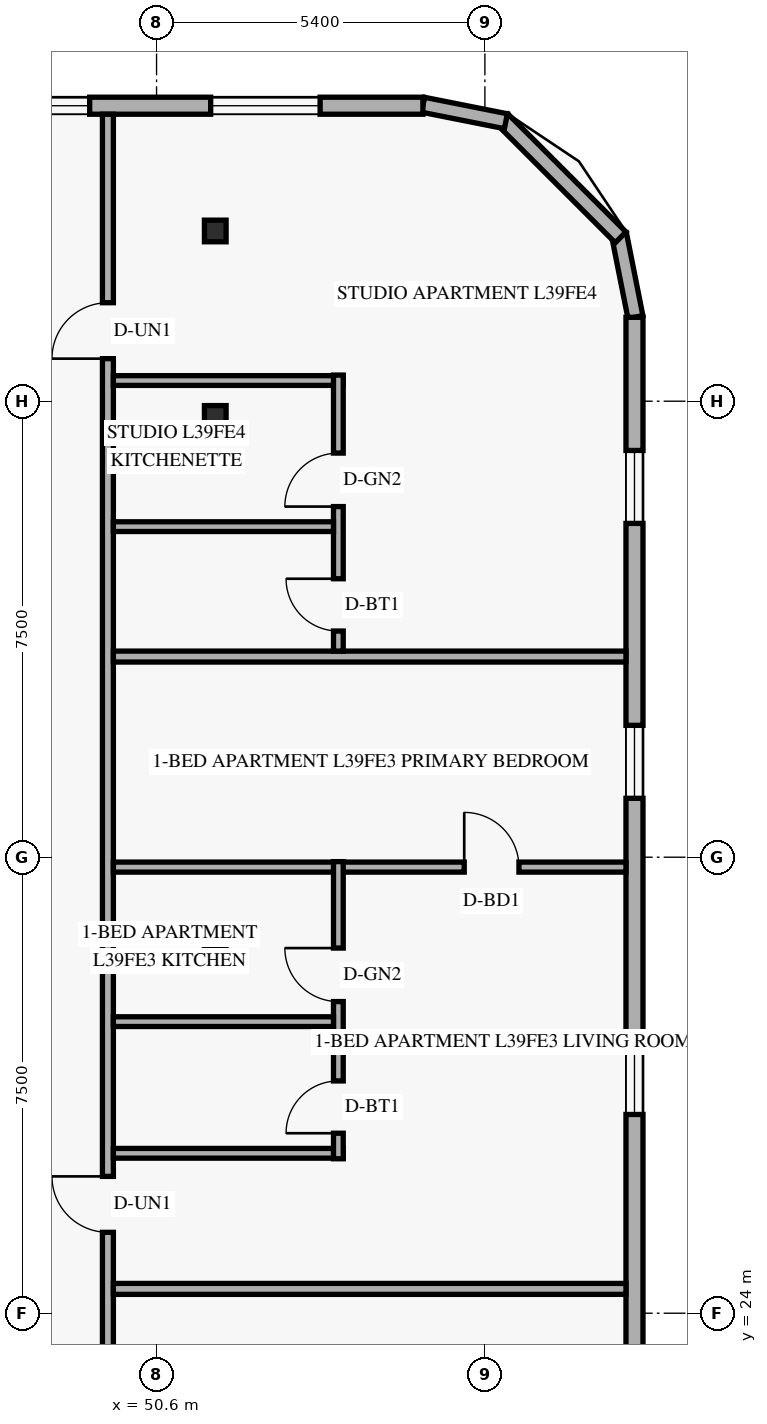
"""IFC4 building model, lengths in metres.
Left out: names, types, materials, properties, quantities, classifications, styles, units other than length and angle.
Written with IfcOpenShell. Run it as: python <this file> out.ifc"""

import sys

from ifc_helpers import new_model, si_unit, direction, frame, frame_2d, origin, origin_2d, place, context, subcontext, project, spatial, rectangle, hollow_rectangle, extrude, element, fill, save


model = new_model("IFC4")
c1 = context("Model", 3, precision=1e-05, world=origin(), true_north=direction((0.0, 1.0)))
c2 = subcontext(c1, "Body", "Model", "MODEL_VIEW")
j1 = project(units=[si_unit("LENGTHUNIT", "METRE"), si_unit("PLANEANGLEUNIT", "RADIAN")], contexts=[c1])
p1 = place(None, origin())
s1 = spatial("IfcSite", under=j1, at=p1, CompositionType="ELEMENT")
p2 = place(p1, origin())
s2 = spatial("IfcBuilding", under=s1, at=p2, CompositionType="ELEMENT")
p3 = place(p2, frame((0.0, 0.0, 151.8)))
s3 = spatial("IfcBuildingStorey", under=s2, at=p3, CompositionType="ELEMENT", Elevation=151.8)
for number, where, z_axis, x_axis in (
    (1, (51.461, 30.2, 0.0), (0.058, 0.0, 0.998), (0.0, 1.0, 0.0)),
    (2, (51.461, 38.75, 0.0), (0.058, 0.0, 0.998), (0.0, 1.0, 0.0)),
    (3, (51.461, 41.8, 0.0), (0.058, 0.0, 0.998), (0.0, 1.0, 0.0)),
):
    element("IfcColumn", number, at=place(p3, frame(where, z_axis=z_axis, x_axis=x_axis)), inside=s3, PredefinedType="COLUMN", context=c2, shape_type="SweptSolid", body=[
        extrude(hollow_rectangle(XDim=0.356, YDim=0.356, WallThickness=0.016, at=origin_2d()), origin(), (0.0, 0.0, 1.0), 3.606),
    ])
p4 = place(p3, frame((58.476, 40.384, 0.0), z_axis=(0.0, 0.0, 1.0), x_axis=(-0.19496651342, 0.980809899341, 0.0)))
e4 = element("IfcWall", 4, at=p4, inside=s3, PredefinedType="SOLIDWALL", context=c2, shape_type="SweptSolid", body=[
    extrude(rectangle(XDim=1.389, YDim=0.25, at=frame_2d((0.694, 0.0))), origin(), (0.0, 0.0, 1.0), 3.36),
])
p5 = place(p3, frame((58.232, 41.695, 0.0), z_axis=(0.0, 0.0, 1.0), x_axis=(-0.707106781187, 0.707106781187, 0.0)))
e5 = element("IfcWall", 5, at=p5, inside=s3, PredefinedType="SOLIDWALL", context=c2, shape_type="SweptSolid", body=[
    extrude(rectangle(XDim=2.739, YDim=0.25, at=frame_2d((1.37, 0.0))), origin(), (0.0, 0.0, 1.0), 3.36),
])
p6 = place(p3, frame((56.345, 43.605, 0.0), z_axis=(0.0, 0.0, 1.0), x_axis=(-0.980809899341, 0.19496651342, 0.0)))
e6 = element("IfcWall", 6, at=p6, inside=s3, PredefinedType="SOLIDWALL", context=c2, shape_type="SweptSolid", body=[
    extrude(rectangle(XDim=1.389, YDim=0.25, at=frame_2d((0.694, 0.0))), origin(), (0.0, 0.0, 1.0), 3.36),
])
p7 = place(p3, frame((58.46, 7.62, 0.0), z_axis=(0.0, 0.0, 1.0), x_axis=(0.0, 1.0, 0.0)))
e7 = element("IfcWall", 7, at=p7, inside=s3, PredefinedType="SOLIDWALL", context=c2, shape_type="SweptSolid", body=[
    extrude(rectangle(XDim=32.76, YDim=0.28, at=frame_2d((16.38, 0.0))), origin(), (0.0, 0.0, 1.0), 3.36),
])
p8 = place(p7, frame((2.39, 0.0, 0.85)))
e8 = element("IfcOpeningElement", 8, at=p8, cuts=e7, PredefinedType="OPENING", context=c2, shape_type="SweptSolid", body=[
    extrude(rectangle(XDim=1.2, YDim=1.5, at=frame_2d((0.6, 0.75))), frame((0.0, 0.15, 0.0), z_axis=(0.0, -1.0, 0.0), x_axis=(1.0, 0.0, 0.0)), (0.0, 0.0, 1.0), 0.3),
])
p9 = place(p7, frame((8.325, 0.0, 0.85)))
e9 = element("IfcOpeningElement", 9, at=p9, cuts=e7, PredefinedType="OPENING", context=c2, shape_type="SweptSolid", body=[
    extrude(rectangle(XDim=1.2, YDim=1.5, at=frame_2d((0.6, 0.75))), frame((0.0, 0.15, 0.0), z_axis=(0.0, -1.0, 0.0), x_axis=(1.0, 0.0, 0.0)), (0.0, 0.0, 1.0), 0.3),
])
p10 = place(p7, frame((13.725, 0.0, 0.85)))
e10 = element("IfcOpeningElement", 10, at=p10, cuts=e7, PredefinedType="OPENING", context=c2, shape_type="SweptSolid", body=[
    extrude(rectangle(XDim=1.2, YDim=1.5, at=frame_2d((0.6, 0.75))), frame((0.0, 0.15, 0.0), z_axis=(0.0, -1.0, 0.0), x_axis=(1.0, 0.0, 0.0)), (0.0, 0.0, 1.0), 0.3),
])
p11 = place(p7, frame((19.649, 0.0, 0.85)))
e11 = element("IfcOpeningElement", 11, at=p11, cuts=e7, PredefinedType="OPENING", context=c2, shape_type="SweptSolid", body=[
    extrude(rectangle(XDim=1.2, YDim=1.5, at=frame_2d((0.6, 0.75))), frame((0.0, 0.15, 0.0), z_axis=(0.0, -1.0, 0.0), x_axis=(1.0, 0.0, 0.0)), (0.0, 0.0, 1.0), 0.3),
])
p12 = place(p7, frame((24.849, 0.0, 0.85)))
e12 = element("IfcOpeningElement", 12, at=p12, cuts=e7, PredefinedType="OPENING", context=c2, shape_type="SweptSolid", body=[
    extrude(rectangle(XDim=1.2, YDim=1.5, at=frame_2d((0.6, 0.75))), frame((0.0, 0.15, 0.0), z_axis=(0.0, -1.0, 0.0), x_axis=(1.0, 0.0, 0.0)), (0.0, 0.0, 1.0), 0.3),
])
p13 = place(p7, frame((29.37, 0.0, 0.85)))
e13 = element("IfcOpeningElement", 13, at=p13, cuts=e7, PredefinedType="OPENING", context=c2, shape_type="SweptSolid", body=[
    extrude(rectangle(XDim=1.2, YDim=1.5, at=frame_2d((0.6, 0.75))), frame((0.0, 0.15, 0.0), z_axis=(0.0, -1.0, 0.0), x_axis=(1.0, 0.0, 0.0)), (0.0, 0.0, 1.0), 0.3),
])
p14 = place(p3, frame((54.98, 43.86, 0.0), z_axis=(0.0, 0.0, 1.0), x_axis=(-1.0, 0.0, 0.0)))
e14 = element("IfcWall", 14, at=p14, inside=s3, PredefinedType="SOLIDWALL", context=c2, shape_type="SweptSolid", body=[
    extrude(rectangle(XDim=33.76, YDim=0.28, at=frame_2d((16.88, 0.0))), origin(), (0.0, 0.0, 1.0), 3.36),
])
p15 = place(p14, frame((28.055, 0.0, 0.85)))
e15 = element("IfcOpeningElement", 15, at=p15, cuts=e14, PredefinedType="OPENING", context=c2, shape_type="SweptSolid", body=[
    extrude(rectangle(XDim=1.8, YDim=1.6, at=frame_2d((0.9, 0.8))), frame((0.0, 0.15, 0.0), z_axis=(0.0, -1.0, 0.0), x_axis=(1.0, 0.0, 0.0)), (0.0, 0.0, 1.0), 0.3),
])
p16 = place(p14, frame((21.17, 0.0, 0.85)))
e16 = element("IfcOpeningElement", 16, at=p16, cuts=e14, PredefinedType="OPENING", context=c2, shape_type="SweptSolid", body=[
    extrude(rectangle(XDim=1.8, YDim=1.6, at=frame_2d((0.9, 0.8))), frame((0.0, 0.15, 0.0), z_axis=(0.0, -1.0, 0.0), x_axis=(1.0, 0.0, 0.0)), (0.0, 0.0, 1.0), 0.3),
])
p17 = place(p14, frame((14.865, 0.0, 0.85)))
e17 = element("IfcOpeningElement", 17, at=p17, cuts=e14, PredefinedType="OPENING", context=c2, shape_type="SweptSolid", body=[
    extrude(rectangle(XDim=1.8, YDim=1.6, at=frame_2d((0.9, 0.8))), frame((0.0, 0.15, 0.0), z_axis=(0.0, -1.0, 0.0), x_axis=(1.0, 0.0, 0.0)), (0.0, 0.0, 1.0), 0.3),
])
p18 = place(p14, frame((8.575, 0.0, 0.85)))
e18 = element("IfcOpeningElement", 18, at=p18, cuts=e14, PredefinedType="OPENING", context=c2, shape_type="SweptSolid", body=[
    extrude(rectangle(XDim=1.8, YDim=1.6, at=frame_2d((0.9, 0.8))), frame((0.0, 0.15, 0.0), z_axis=(0.0, -1.0, 0.0), x_axis=(1.0, 0.0, 0.0)), (0.0, 0.0, 1.0), 0.3),
])
p19 = place(p14, frame((5.48, 0.0, 0.85)))
e19 = element("IfcOpeningElement", 19, at=p19, cuts=e14, PredefinedType="OPENING", context=c2, shape_type="SweptSolid", body=[
    extrude(rectangle(XDim=1.2, YDim=1.5, at=frame_2d((0.6, 0.75))), frame((0.0, 0.15, 0.0), z_axis=(0.0, -1.0, 0.0), x_axis=(1.0, 0.0, 0.0)), (0.0, 0.0, 1.0), 0.3),
])
p20 = place(p14, frame((1.69, 0.0, 0.85)))
e20 = element("IfcOpeningElement", 20, at=p20, cuts=e14, PredefinedType="OPENING", context=c2, shape_type="SweptSolid", body=[
    extrude(rectangle(XDim=1.8, YDim=1.6, at=frame_2d((0.9, 0.8))), frame((0.0, 0.15, 0.0), z_axis=(0.0, -1.0, 0.0), x_axis=(1.0, 0.0, 0.0)), (0.0, 0.0, 1.0), 0.3),
])
p21 = place(p3, frame((49.8, 4.28, 0.0), z_axis=(0.0, 0.0, 1.0), x_axis=(0.0, 1.0, 0.0)))
e21 = element("IfcWall", 21, at=p21, inside=s3, PredefinedType="STANDARD", context=c2, shape_type="SweptSolid", body=[
    extrude(rectangle(XDim=39.44, YDim=0.18, at=frame_2d((19.72, 0.0))), origin(), (0.0, 0.0, 1.0), 2.73),
])
p22 = place(p21, frame((3.38, 0.0, 0.0)))
e22 = element("IfcOpeningElement", 22, at=p22, cuts=e21, PredefinedType="OPENING", context=c2, shape_type="SweptSolid", body=[
    extrude(rectangle(XDim=0.92, YDim=2.15, at=frame_2d((0.46, 1.075))), frame((0.0, 0.1, 0.0), z_axis=(0.0, -1.0, 0.0), x_axis=(1.0, 0.0, 0.0)), (0.0, 0.0, 1.0), 0.2),
])
p23 = place(p21, frame((14.32, 0.0, 0.0)))
e23 = element("IfcOpeningElement", 23, at=p23, cuts=e21, PredefinedType="OPENING", context=c2, shape_type="SweptSolid", body=[
    extrude(rectangle(XDim=0.92, YDim=2.15, at=frame_2d((0.46, 1.075))), frame((0.0, 0.1, 0.0), z_axis=(0.0, -1.0, 0.0), x_axis=(1.0, 0.0, 0.0)), (0.0, 0.0, 1.0), 0.2),
])
p24 = place(p21, frame((21.05, 0.0, 0.0)))
e24 = element("IfcOpeningElement", 24, at=p24, cuts=e21, PredefinedType="OPENING", context=c2, shape_type="SweptSolid", body=[
    extrude(rectangle(XDim=0.92, YDim=2.15, at=frame_2d((0.46, 1.075))), frame((0.0, 0.1, 0.0), z_axis=(0.0, -1.0, 0.0), x_axis=(1.0, 0.0, 0.0)), (0.0, 0.0, 1.0), 0.2),
])
p25 = place(p21, frame((35.42, 0.0, 0.0)))
e25 = element("IfcOpeningElement", 25, at=p25, cuts=e21, PredefinedType="OPENING", context=c2, shape_type="SweptSolid", body=[
    extrude(rectangle(XDim=0.92, YDim=2.15, at=frame_2d((0.46, 1.075))), frame((0.0, 0.1, 0.0), z_axis=(0.0, -1.0, 0.0), x_axis=(1.0, 0.0, 0.0)), (0.0, 0.0, 1.0), 0.2),
])
p26 = place(p3, frame((49.89, 24.4, 0.0), z_axis=(0.0, 0.0, 1.0), x_axis=(1.0, 0.0, 0.0)))
e26 = element("IfcWall", 26, at=p26, inside=s3, PredefinedType="PARTITIONING", context=c2, shape_type="SweptSolid", body=[
    extrude(rectangle(XDim=8.43, YDim=0.18, at=frame_2d((4.215, 0.0))), origin(), (0.0, 0.0, 1.0), 2.879),
])
p27 = place(p3, frame((49.89, 31.337, 0.0), z_axis=(0.0, 0.0, 1.0), x_axis=(1.0, 0.0, 0.0)))
e27 = element("IfcWall", 27, at=p27, inside=s3, PredefinedType="PARTITIONING", context=c2, shape_type="SweptSolid", body=[
    extrude(rectangle(XDim=8.43, YDim=0.165, at=frame_2d((4.215, 0.0))), origin(), (0.0, 0.0, 1.0), 2.879),
])
p28 = place(p27, frame((5.77, 0.0, 0.0)))
e28 = element("IfcOpeningElement", 28, at=p28, cuts=e27, PredefinedType="OPENING", context=c2, shape_type="SweptSolid", body=[
    extrude(rectangle(XDim=0.9, YDim=2.14, at=frame_2d((0.45, 1.07))), frame((0.0, 0.093, 0.0), z_axis=(0.0, -1.0, 0.0), x_axis=(1.0, 0.0, 0.0)), (0.0, 0.0, 1.0), 0.185),
])
p29 = place(p3, frame((49.89, 26.63, 0.0), z_axis=(0.0, 0.0, 1.0), x_axis=(1.0, 0.0, 0.0)))
e29 = element("IfcWall", 29, at=p29, inside=s3, PredefinedType="PLUMBINGWALL", context=c2, shape_type="SweptSolid", body=[
    extrude(rectangle(XDim=3.78, YDim=0.16, at=frame_2d((1.89, 0.0))), origin(), (0.0, 0.0, 1.0), 2.879),
])
p30 = place(p3, frame((53.59, 26.54, 0.0), z_axis=(0.0, 0.0, 1.0), x_axis=(0.0, 1.0, 0.0)))
e30 = element("IfcWall", 30, at=p30, inside=s3, PredefinedType="PLUMBINGWALL", context=c2, shape_type="SweptSolid", body=[
    extrude(rectangle(XDim=4.887, YDim=0.16, at=frame_2d((2.444, 0.0))), origin(), (0.0, 0.0, 1.0), 3.36),
])
p31 = place(p30, frame((0.42, 0.0, 0.0)))
e31 = element("IfcOpeningElement", 31, at=p31, cuts=e30, PredefinedType="OPENING", context=c2, shape_type="SweptSolid", body=[
    extrude(rectangle(XDim=0.86, YDim=2.12, at=frame_2d((0.43, 1.06))), frame((0.0, 0.09, 0.0), z_axis=(0.0, -1.0, 0.0), x_axis=(1.0, 0.0, 0.0)), (0.0, 0.0, 1.0), 0.18),
])
p32 = place(p30, frame((2.585, 0.0, 0.0)))
e32 = element("IfcOpeningElement", 32, at=p32, cuts=e30, PredefinedType="OPENING", context=c2, shape_type="SweptSolid", body=[
    extrude(rectangle(XDim=0.88, YDim=2.12, at=frame_2d((0.44, 1.06))), frame((0.0, 0.09, 0.0), z_axis=(0.0, -1.0, 0.0), x_axis=(1.0, 0.0, 0.0)), (0.0, 0.0, 1.0), 0.18),
])
p33 = place(p3, frame((49.89, 28.796, 0.0), z_axis=(0.0, 0.0, 1.0), x_axis=(1.0, 0.0, 0.0)))
e33 = element("IfcWall", 33, at=p33, inside=s3, PredefinedType="PLUMBINGWALL", context=c2, shape_type="SweptSolid", body=[
    extrude(rectangle(XDim=3.62, YDim=0.16, at=frame_2d((1.81, 0.0))), origin(), (0.0, 0.0, 1.0), 2.879),
])
p34 = place(p3, frame((49.89, 34.8, 0.0), z_axis=(0.0, 0.0, 1.0), x_axis=(1.0, 0.0, 0.0)))
e34 = element("IfcWall", 34, at=p34, inside=s3, PredefinedType="PARTITIONING", context=c2, shape_type="SweptSolid", body=[
    extrude(rectangle(XDim=8.43, YDim=0.18, at=frame_2d((4.215, 0.0))), origin(), (0.0, 0.0, 1.0), 2.879),
])
p35 = place(p3, frame((49.89, 39.34, 0.0), z_axis=(0.0, 0.0, 1.0), x_axis=(1.0, 0.0, 0.0)))
e35 = element("IfcWall", 35, at=p35, inside=s3, PredefinedType="PLUMBINGWALL", context=c2, shape_type="SweptSolid", body=[
    extrude(rectangle(XDim=3.78, YDim=0.16, at=frame_2d((1.89, 0.0))), origin(), (0.0, 0.0, 1.0), 2.879),
])
p36 = place(p3, frame((53.59, 34.89, 0.0), z_axis=(0.0, 0.0, 1.0), x_axis=(0.0, 1.0, 0.0)))
e36 = element("IfcWall", 36, at=p36, inside=s3, PredefinedType="PLUMBINGWALL", context=c2, shape_type="SweptSolid", body=[
    extrude(rectangle(XDim=4.54, YDim=0.16, at=frame_2d((2.27, 0.0))), origin(), (0.0, 0.0, 1.0), 3.36),
])
p37 = place(p36, frame((0.33, 0.0, 0.0)))
e37 = element("IfcOpeningElement", 37, at=p37, cuts=e36, PredefinedType="OPENING", context=c2, shape_type="SweptSolid", body=[
    extrude(rectangle(XDim=0.86, YDim=2.12, at=frame_2d((0.43, 1.06))), frame((0.0, 0.09, 0.0), z_axis=(0.0, -1.0, 0.0), x_axis=(1.0, 0.0, 0.0)), (0.0, 0.0, 1.0), 0.18),
])
p38 = place(p36, frame((2.377, 0.0, 0.0)))
e38 = element("IfcOpeningElement", 38, at=p38, cuts=e36, PredefinedType="OPENING", context=c2, shape_type="SweptSolid", body=[
    extrude(rectangle(XDim=0.88, YDim=2.12, at=frame_2d((0.44, 1.06))), frame((0.0, 0.09, 0.0), z_axis=(0.0, -1.0, 0.0), x_axis=(1.0, 0.0, 0.0)), (0.0, 0.0, 1.0), 0.18),
])
p39 = place(p3, frame((49.89, 36.937, 0.0), z_axis=(0.0, 0.0, 1.0), x_axis=(1.0, 0.0, 0.0)))
e39 = element("IfcWall", 39, at=p39, inside=s3, PredefinedType="PLUMBINGWALL", context=c2, shape_type="SweptSolid", body=[
    extrude(rectangle(XDim=3.62, YDim=0.16, at=frame_2d((1.81, 0.0))), origin(), (0.0, 0.0, 1.0), 2.879),
])
p40 = place(p11, origin())
e40 = element("IfcWindow", 40, at=p40, inside=s3, PartitioningType="SINGLE_PANEL", PredefinedType="WINDOW", context=c2, shape_type="SweptSolid", body=[
    extrude(rectangle(XDim=1.2, YDim=1.5, at=frame_2d((0.6, 0.75))), frame((0.0, 0.03, 0.0), z_axis=(0.0, -1.0, 0.0), x_axis=(1.0, 0.0, 0.0)), (0.0, 0.0, 1.0), 0.06),
])
fill(e11, e40)
p41 = place(p12, origin())
e41 = element("IfcWindow", 41, at=p41, inside=s3, PartitioningType="SINGLE_PANEL", PredefinedType="WINDOW", context=c2, shape_type="SweptSolid", body=[
    extrude(rectangle(XDim=1.2, YDim=1.5, at=frame_2d((0.6, 0.75))), frame((0.0, 0.03, 0.0), z_axis=(0.0, -1.0, 0.0), x_axis=(1.0, 0.0, 0.0)), (0.0, 0.0, 1.0), 0.06),
])
fill(e12, e41)
p42 = place(p13, origin())
e42 = element("IfcWindow", 42, at=p42, inside=s3, PartitioningType="SINGLE_PANEL", PredefinedType="WINDOW", context=c2, shape_type="SweptSolid", body=[
    extrude(rectangle(XDim=1.2, YDim=1.5, at=frame_2d((0.6, 0.75))), frame((0.0, 0.03, 0.0), z_axis=(0.0, -1.0, 0.0), x_axis=(1.0, 0.0, 0.0)), (0.0, 0.0, 1.0), 0.06),
])
fill(e13, e42)
p43 = place(p19, origin())
e43 = element("IfcWindow", 43, at=p43, inside=s3, PartitioningType="SINGLE_PANEL", PredefinedType="WINDOW", context=c2, shape_type="SweptSolid", body=[
    extrude(rectangle(XDim=1.2, YDim=1.5, at=frame_2d((0.6, 0.75))), frame((0.0, 0.03, 0.0), z_axis=(0.0, -1.0, 0.0), x_axis=(1.0, 0.0, 0.0)), (0.0, 0.0, 1.0), 0.06),
])
fill(e19, e43)
p44 = place(p20, origin())
e44 = element("IfcWindow", 44, at=p44, inside=s3, PartitioningType="SINGLE_PANEL", PredefinedType="WINDOW", context=c2, shape_type="SweptSolid", body=[
    extrude(rectangle(XDim=1.8, YDim=1.6, at=frame_2d((0.9, 0.8))), frame((0.0, 0.03, 0.0), z_axis=(0.0, -1.0, 0.0), x_axis=(1.0, 0.0, 0.0)), (0.0, 0.0, 1.0), 0.06),
])
fill(e20, e44)
p45 = place(p24, origin())
e45 = element("IfcDoor", 45, at=p45, inside=s3, OperationType="SINGLE_SWING_RIGHT", PredefinedType="DOOR", context=c2, shape_type="SweptSolid", body=[
    extrude(rectangle(XDim=0.92, YDim=2.15, at=frame_2d((0.46, 1.075))), frame((0.0, 0.025, 0.0), z_axis=(0.0, -1.0, 0.0), x_axis=(1.0, 0.0, 0.0)), (0.0, 0.0, 1.0), 0.05),
])
fill(e24, e45)
p46 = place(p31, origin())
e46 = element("IfcDoor", 46, at=p46, inside=s3, OperationType="SINGLE_SWING_LEFT", PredefinedType="DOOR", context=c2, shape_type="SweptSolid", body=[
    extrude(rectangle(XDim=0.86, YDim=2.12, at=frame_2d((0.43, 1.06))), frame((0.0, 0.025, 0.0), z_axis=(0.0, -1.0, 0.0), x_axis=(1.0, 0.0, 0.0)), (0.0, 0.0, 1.0), 0.05),
])
fill(e31, e46)
p47 = place(p32, origin())
e47 = element("IfcDoor", 47, at=p47, inside=s3, OperationType="SINGLE_SWING_RIGHT", PredefinedType="DOOR", context=c2, shape_type="SweptSolid", body=[
    extrude(rectangle(XDim=0.88, YDim=2.12, at=frame_2d((0.44, 1.06))), frame((0.0, 0.025, 0.0), z_axis=(0.0, -1.0, 0.0), x_axis=(1.0, 0.0, 0.0)), (0.0, 0.0, 1.0), 0.05),
])
fill(e32, e47)
p48 = place(p28, origin())
e48 = element("IfcDoor", 48, at=p48, inside=s3, OperationType="SINGLE_SWING_LEFT", PredefinedType="DOOR", context=c2, shape_type="SweptSolid", body=[
    extrude(rectangle(XDim=0.9, YDim=2.14, at=frame_2d((0.45, 1.07))), frame((0.0, 0.025, 0.0), z_axis=(0.0, -1.0, 0.0), x_axis=(1.0, 0.0, 0.0)), (0.0, 0.0, 1.0), 0.05),
])
fill(e28, e48)
p49 = place(p25, origin())
e49 = element("IfcDoor", 49, at=p49, inside=s3, OperationType="SINGLE_SWING_LEFT", PredefinedType="DOOR", context=c2, shape_type="SweptSolid", body=[
    extrude(rectangle(XDim=0.92, YDim=2.15, at=frame_2d((0.46, 1.075))), frame((0.0, 0.025, 0.0), z_axis=(0.0, -1.0, 0.0), x_axis=(1.0, 0.0, 0.0)), (0.0, 0.0, 1.0), 0.05),
])
fill(e25, e49)
p50 = place(p37, origin())
e50 = element("IfcDoor", 50, at=p50, inside=s3, OperationType="SINGLE_SWING_RIGHT", PredefinedType="DOOR", context=c2, shape_type="SweptSolid", body=[
    extrude(rectangle(XDim=0.86, YDim=2.12, at=frame_2d((0.43, 1.06))), frame((0.0, 0.025, 0.0), z_axis=(0.0, -1.0, 0.0), x_axis=(1.0, 0.0, 0.0)), (0.0, 0.0, 1.0), 0.05),
])
fill(e37, e50)
p51 = place(p38, origin())
e51 = element("IfcDoor", 51, at=p51, inside=s3, OperationType="SINGLE_SWING_LEFT", PredefinedType="DOOR", context=c2, shape_type="SweptSolid", body=[
    extrude(rectangle(XDim=0.88, YDim=2.12, at=frame_2d((0.44, 1.06))), frame((0.0, 0.025, 0.0), z_axis=(0.0, -1.0, 0.0), x_axis=(1.0, 0.0, 0.0)), (0.0, 0.0, 1.0), 0.05),
])
fill(e38, e51)
save(model, sys.argv[1])
